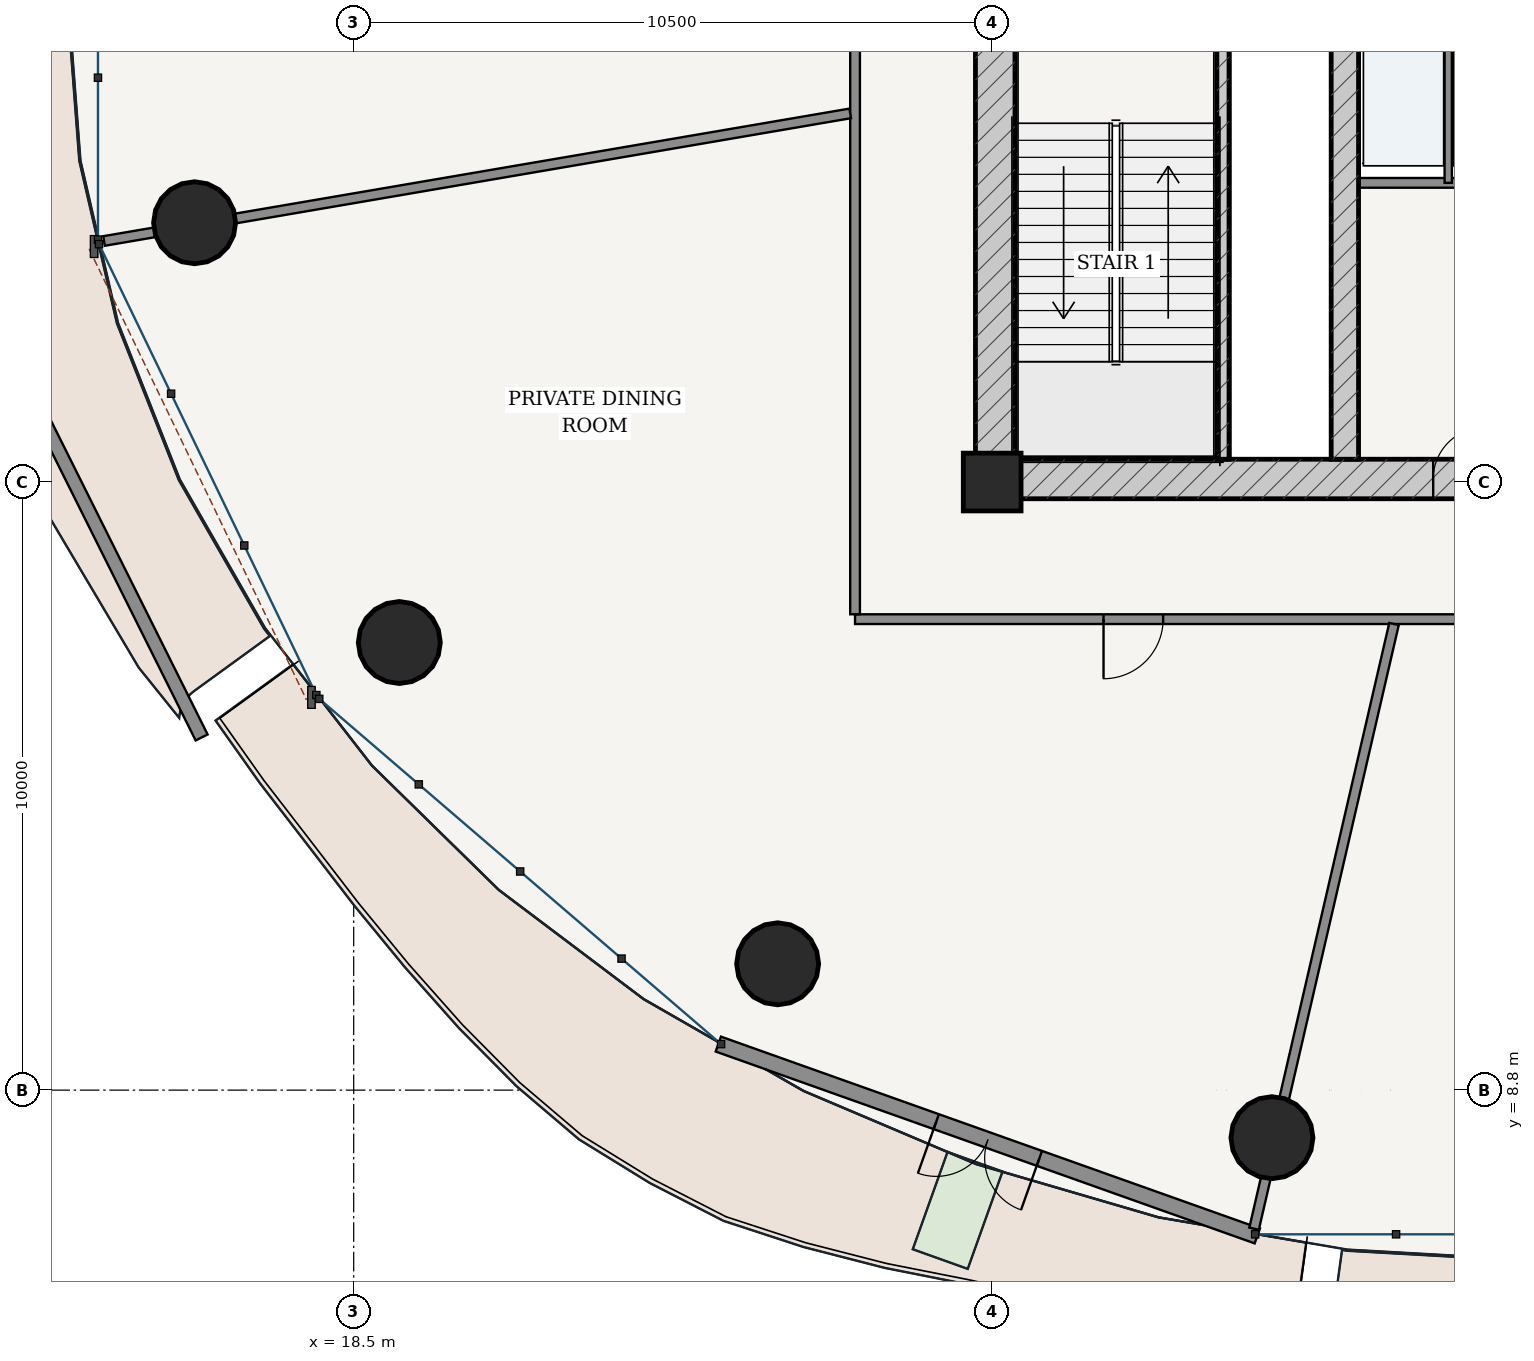
"""IFC4 building model, lengths in metres.
Left out: names, types, materials, properties, quantities, classifications, styles, units other than length and angle.
Written with IfcOpenShell. Run it as: python <this file> out.ifc"""

import sys

from ifc_helpers import new_model, si_unit, direction, frame, frame_2d, origin, origin_2d, place, context, subcontext, project, spatial, rectangle, hollow_circle, extrude, source, transform, mapped, element, fill, save


model = new_model("IFC4")
c1 = context("Model", 3, precision=1e-05, world=origin(), true_north=direction((-0.2419218956, 0.970295726276)))
c2 = subcontext(c1, "Body", "Model", "MODEL_VIEW")
j1 = project(units=[si_unit("LENGTHUNIT", "METRE"), si_unit("PLANEANGLEUNIT", "RADIAN")], contexts=[c1])
p1 = place(None, origin())
s1 = spatial("IfcSite", under=j1, at=p1, CompositionType="ELEMENT")
p2 = place(p1, origin())
s2 = spatial("IfcBuilding", under=s1, at=p2, CompositionType="ELEMENT")
p3 = place(p2, frame((0.0, 0.0, 130.2)))
s3 = spatial("IfcBuildingStorey", under=s2, at=p3, CompositionType="ELEMENT", Elevation=130.2)
p4 = place(p3, frame((29.0, 18.8, 0.0), z_axis=(0.0, 0.0, 1.0), x_axis=(1.0, 0.0, 0.0)))
e1 = element("IfcColumn", 1, at=p4, inside=s3, PredefinedType="COLUMN", context=c2, shape_type="SweptSolid", body=[
    extrude(rectangle(XDim=0.95, YDim=0.95, at=origin_2d()), origin(), (0.0, 0.0, 1.0), 5.2),
])
p5 = place(p3, frame((28.725, 18.85, 0.0), z_axis=(0.0, 0.0, 1.0), x_axis=(1.0, 0.0, 0.0)))
e2 = element("IfcWall", 2, at=p5, inside=s3, PredefinedType="SHEAR", context=c2, shape_type="SweptSolid", body=[
    extrude(rectangle(XDim=18.55, YDim=0.65, at=frame_2d((9.275, 0.0))), origin(), (0.0, 0.0, 1.0), 4.93),
])
p6 = place(p5, frame((7.528, 0.0, 0.0)))
e3 = element("IfcOpeningElement", 3, at=p6, cuts=e2, PredefinedType="OPENING", context=c2, shape_type="SweptSolid", body=[
    extrude(rectangle(XDim=0.85, YDim=2.1, at=frame_2d((0.425, 1.05))), frame((0.0, 0.335, 0.0), z_axis=(0.0, -1.0, 0.0), x_axis=(1.0, 0.0, 0.0)), (0.0, 0.0, 1.0), 0.67),
])
p7 = place(p5, frame((10.573, 0.0, 0.0)))
e4 = element("IfcOpeningElement", 4, at=p7, cuts=e2, PredefinedType="OPENING", context=c2, shape_type="SweptSolid", body=[
    extrude(rectangle(XDim=0.85, YDim=2.1, at=frame_2d((0.425, 1.05))), frame((0.0, 0.335, 0.0), z_axis=(0.0, -1.0, 0.0), x_axis=(1.0, 0.0, 0.0)), (0.0, 0.0, 1.0), 0.67),
])
p8 = place(p3, frame((29.05, 19.175, 0.0), z_axis=(0.0, 0.0, 1.0), x_axis=(0.0, 1.0, 0.0)))
e5 = element("IfcWall", 5, at=p8, inside=s3, PredefinedType="SHEAR", context=c2, shape_type="SweptSolid", body=[
    extrude(rectangle(XDim=15.25, YDim=0.65, at=frame_2d((7.625, 0.0))), origin(), (0.0, 0.0, 1.0), 4.93),
])
p9 = place(p8, frame((9.875, 0.0, 0.0)))
e6 = element("IfcOpeningElement", 6, at=p9, cuts=e5, PredefinedType="OPENING", context=c2, shape_type="SweptSolid", body=[
    extrude(rectangle(XDim=1.5, YDim=2.2, at=frame_2d((0.75, 1.1))), frame((0.0, 0.335, 0.0), z_axis=(0.0, -1.0, 0.0), x_axis=(1.0, 0.0, 0.0)), (0.0, 0.0, 1.0), 0.67),
])
p10 = place(p3, frame((32.795, 19.175, 0.0), z_axis=(0.0, 0.0, 1.0), x_axis=(0.0, 1.0, 0.0)))
e7 = element("IfcWall", 7, at=p10, inside=s3, PredefinedType="SOLIDWALL", context=c2, shape_type="SweptSolid", body=[
    extrude(rectangle(XDim=7.375, YDim=0.2, at=frame_2d((3.688, 0.0))), origin(), (0.0, 0.0, 1.0), 4.93),
])
p11 = place(p3, frame((34.8, 19.175, 0.0), z_axis=(0.0, 0.0, 1.0), x_axis=(0.0, 1.0, 0.0)))
e8 = element("IfcWall", 8, at=p11, inside=s3, PredefinedType="SHEAR", context=c2, shape_type="SweptSolid", body=[
    extrude(rectangle(XDim=15.25, YDim=0.45, at=frame_2d((7.625, 0.0))), origin(), (0.0, 0.0, 1.0), 4.93),
])
p12 = place(p11, frame((7.8, 0.0, 0.0)))
e9 = element("IfcOpeningElement", 9, at=p12, cuts=e8, PredefinedType="OPENING", context=c2, shape_type="SweptSolid", body=[
    extrude(rectangle(XDim=1.05, YDim=2.15, at=frame_2d((0.525, 1.075))), frame((0.0, 0.235, 0.0), z_axis=(0.0, -1.0, 0.0), x_axis=(1.0, 0.0, 0.0)), (0.0, 0.0, 1.0), 0.47),
])
for number, where, z_axis, x_axis in (
    (10, (15.883, 23.064, 0.0), (0.0, 0.0, 1.0), (1.0, 0.0, 0.0)),
    (11, (19.25, 16.161, 0.0), (0.0, 0.0, 1.0), (1.0, 0.0, 0.0)),
    (12, (25.472, 10.877, 0.0), (0.0, 0.0, 1.0), (1.0, 0.0, 0.0)),
    (13, (33.601, 8.018, 0.0), (0.0, 0.0, 1.0), (1.0, 0.0, 0.0)),
):
    element("IfcColumn", number, at=place(p3, frame(where, z_axis=z_axis, x_axis=x_axis)), inside=s3, PredefinedType="COLUMN", context=c2, shape_type="SweptSolid", body=[
        extrude(hollow_circle(Radius=0.675, WallThickness=0.042, at=origin_2d()), origin(), (0.0, 0.0, 1.0), 5.2),
    ])
p13 = place(p3, frame((24.497, 9.557, 0.0), z_axis=(0.0, 0.0, 1.0), x_axis=(0.942103604331, -0.335321932934, 0.0)))
e14 = element("IfcWall", 14, at=p13, inside=s3, PredefinedType="SOLIDWALL", context=c2, shape_type="SweptSolid", body=[
    extrude(rectangle(XDim=9.408, YDim=0.26, at=frame_2d((4.704, 0.0))), origin(), (0.0, 0.0, 1.0), 4.93),
])
p14 = place(p13, frame((3.804, 0.0, 0.0)))
e15 = element("IfcOpeningElement", 15, at=p14, cuts=e14, PredefinedType="OPENING", context=c2, shape_type="SweptSolid", body=[
    extrude(rectangle(XDim=1.8, YDim=2.3, at=frame_2d((0.9, 1.15))), frame((0.0, 0.14, 0.0), z_axis=(0.0, -1.0, 0.0), x_axis=(1.0, 0.0, 0.0)), (0.0, 0.0, 1.0), 0.28),
])
p15 = place(p3, frame((12.048, 22.516, 0.0), z_axis=(0.0, 0.0, 1.0), x_axis=(0.4465622461, -0.89475256935, 0.0)))
e16 = element("IfcWall", 16, at=p15, inside=s3, PredefinedType="PARAPET", context=c2, shape_type="SweptSolid", body=[
    extrude(rectangle(XDim=8.847, YDim=0.22, at=frame_2d((4.424, 0.0))), origin(), (0.0, 0.0, 1.0), 1.15),
])
p16 = place(p3, frame((35.025, 23.72, 0.0), z_axis=(0.0, 0.0, 1.0), x_axis=(1.0, 0.0, 0.0)))
e17 = element("IfcWall", 17, at=p16, inside=s3, PredefinedType="PARTITIONING", context=c2, shape_type="SweptSolid", body=[
    extrude(rectangle(XDim=5.95, YDim=0.16, at=frame_2d((2.975, 0.0))), origin(), (0.0, 0.0, 1.0), 4.93),
])
p17 = place(p3, frame((36.5, 23.72, 0.0), z_axis=(0.0, 0.0, 1.0), x_axis=(0.0, 1.0, 0.0)))
e18 = element("IfcWall", 18, at=p17, inside=s3, PredefinedType="PARTITIONING", context=c2, shape_type="SweptSolid", body=[
    extrude(rectangle(XDim=2.56, YDim=0.12, at=frame_2d((1.28, 0.0))), origin(), (0.0, 0.0, 1.0), 4.93),
])
p18 = place(p3, frame((26.745, 16.545, 0.0), z_axis=(0.0, 0.0, 1.0), x_axis=(1.0, 0.0, 0.0)))
e19 = element("IfcWall", 19, at=p18, inside=s3, PredefinedType="PARTITIONING", context=c2, shape_type="SweptSolid", body=[
    extrude(rectangle(XDim=22.51, YDim=0.16, at=frame_2d((11.255, 0.0))), origin(), (0.0, 0.0, 1.0), 4.376),
])
p19 = place(p18, frame((4.086, 0.0, 0.0)))
e20 = element("IfcOpeningElement", 20, at=p19, cuts=e19, PredefinedType="OPENING", context=c2, shape_type="SweptSolid", body=[
    extrude(rectangle(XDim=0.98, YDim=2.2, at=frame_2d((0.49, 1.1))), frame((0.0, 0.09, 0.0), z_axis=(0.0, -1.0, 0.0), x_axis=(1.0, 0.0, 0.0)), (0.0, 0.0, 1.0), 0.18),
])
p20 = place(p18, frame((15.112, 0.0, 0.0)))
e21 = element("IfcOpeningElement", 21, at=p20, cuts=e19, PredefinedType="OPENING", context=c2, shape_type="SweptSolid", body=[
    extrude(rectangle(XDim=0.86, YDim=2.1, at=frame_2d((0.43, 1.05))), frame((0.0, 0.09, 0.0), z_axis=(0.0, -1.0, 0.0), x_axis=(1.0, 0.0, 0.0)), (0.0, 0.0, 1.0), 0.18),
])
p21 = place(p3, frame((26.745, 16.625, 0.0), z_axis=(0.0, 0.0, 1.0), x_axis=(0.0, 1.0, 0.0)))
e22 = element("IfcWall", 22, at=p21, inside=s3, PredefinedType="PARTITIONING", context=c2, shape_type="SweptSolid", body=[
    extrude(rectangle(XDim=20.35, YDim=0.16, at=frame_2d((10.175, 0.0))), origin(), (0.0, 0.0, 1.0), 4.376),
])
p22 = place(p21, frame((13.659, 0.0, 0.0)))
e23 = element("IfcOpeningElement", 23, at=p22, cuts=e22, PredefinedType="OPENING", context=c2, shape_type="SweptSolid", body=[
    extrude(rectangle(XDim=0.98, YDim=2.2, at=frame_2d((0.49, 1.1))), frame((0.0, 0.09, 0.0), z_axis=(0.0, -1.0, 0.0), x_axis=(1.0, 0.0, 0.0)), (0.0, 0.0, 1.0), 0.18),
])
p23 = place(p3, frame((26.665, 24.862, 0.0), z_axis=(0.0, 0.0, 1.0), x_axis=(-0.985697276978, -0.168525600897, 0.0)))
e24 = element("IfcWall", 24, at=p23, inside=s3, PredefinedType="PARTITIONING", context=c2, shape_type="SweptSolid", body=[
    extrude(rectangle(XDim=12.448, YDim=0.16, at=frame_2d((6.224, 0.0))), origin(), (0.0, 0.0, 1.0), 4.376),
])
p24 = place(p3, frame((35.608, 16.465, 0.0), z_axis=(0.0, 0.0, 1.0), x_axis=(-0.225467400409, -0.97425071278, 0.0)))
e25 = element("IfcWall", 25, at=p24, inside=s3, PredefinedType="PARTITIONING", context=c2, shape_type="SweptSolid", body=[
    extrude(rectangle(XDim=10.207, YDim=0.16, at=frame_2d((5.103, 0.0))), origin(), (0.0, 0.0, 1.0), 4.376),
])
m1 = source(origin(), c2, "Body", "SweptSolid", [
    extrude(rectangle(XDim=1.8, YDim=2.3, at=frame_2d((0.9, 1.15))), frame((0.0, 0.025, 0.0), z_axis=(0.0, -1.0, 0.0), x_axis=(1.0, 0.0, 0.0)), (0.0, 0.0, 1.0), 0.05),
])
p25 = place(p14, frame((1.8, 0.0, 0.0), z_axis=(0.0, 0.0, 1.0), x_axis=(-1.0, 0.0, 0.0)))
e26 = element("IfcDoor", 26, at=p25, inside=s3, OperationType="DOUBLE_DOOR_SINGLE_SWING", PredefinedType="DOOR", context=c2, shape_type="MappedRepresentation", body=[
    mapped(m1, transform((0.0, 0.0, 0.0), scale=1.0)),
])
fill(e15, e26)
m2 = source(origin(), c2, "Body", "SweptSolid", [
    extrude(rectangle(XDim=0.85, YDim=2.1, at=frame_2d((0.425, 1.05))), frame((0.0, 0.025, 0.0), z_axis=(0.0, -1.0, 0.0), x_axis=(1.0, 0.0, 0.0)), (0.0, 0.0, 1.0), 0.05),
])
p26 = place(p6, origin())
e27 = element("IfcDoor", 27, at=p26, inside=s3, OperationType="SINGLE_SWING_RIGHT", PredefinedType="DOOR", context=c2, shape_type="MappedRepresentation", body=[
    mapped(m2, transform((0.0, 0.0, 0.0), scale=1.0)),
])
fill(e3, e27)
m3 = source(origin(), c2, "Body", "SweptSolid", [
    extrude(rectangle(XDim=0.98, YDim=2.2, at=frame_2d((0.49, 1.1))), frame((0.0, 0.025, 0.0), z_axis=(0.0, -1.0, 0.0), x_axis=(1.0, 0.0, 0.0)), (0.0, 0.0, 1.0), 0.05),
])
p27 = place(p19, frame((0.98, 0.0, 0.0), z_axis=(0.0, 0.0, 1.0), x_axis=(-1.0, 0.0, 0.0)))
e28 = element("IfcDoor", 28, at=p27, inside=s3, OperationType="SINGLE_SWING_RIGHT", PredefinedType="DOOR", context=c2, shape_type="MappedRepresentation", body=[
    mapped(m3, transform((0.0, 0.0, 0.0), scale=1.0)),
])
fill(e20, e28)
save(model, sys.argv[1])
